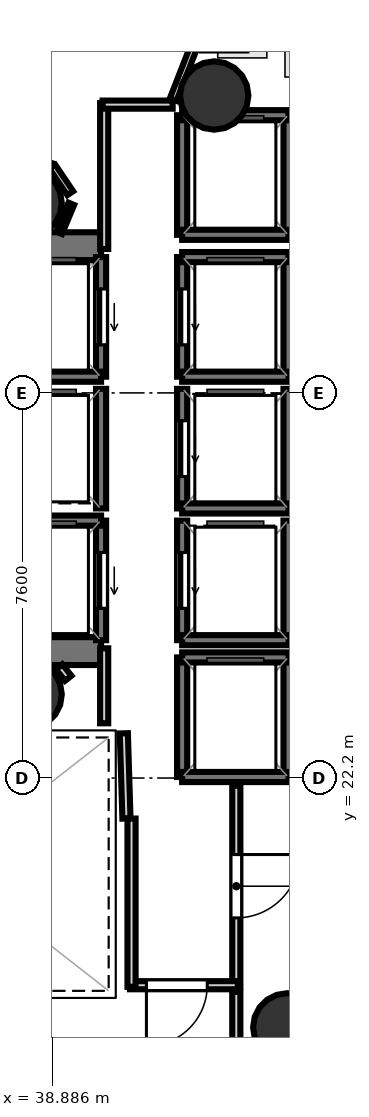
"""IFC4 building model, lengths in metres.
Left out: names, types, materials, properties, quantities, classifications, styles, units other than length and angle.
Written with IfcOpenShell. Run it as: python <this file> out.ifc"""

import sys

from ifc_helpers import new_model, si_unit, direction, frame, frame_2d, origin, origin_2d, place, context, subcontext, project, spatial, rectangle, hollow_circle, extrude, element, fill, save


model = new_model("IFC4")
c1 = context("Model", 3, precision=1e-05, world=origin(), true_north=direction((0.0, 1.0)))
c2 = subcontext(c1, "Body", "Model", "MODEL_VIEW")
j1 = project(units=[si_unit("LENGTHUNIT", "METRE"), si_unit("PLANEANGLEUNIT", "RADIAN")], contexts=[c1])
p1 = place(None, origin())
s1 = spatial("IfcSite", under=j1, at=p1, CompositionType="ELEMENT")
p2 = place(p1, origin())
s2 = spatial("IfcBuilding", under=s1, at=p2, CompositionType="ELEMENT")
p3 = place(p2, frame((0.0, 0.0, 180.9)))
s3 = spatial("IfcBuildingStorey", under=s2, at=p3, CompositionType="ELEMENT", Elevation=180.9)
p4 = place(p3, frame((29.23, 32.695, 0.0), z_axis=(0.0, 0.0, 1.0), x_axis=(1.0, 0.0, 0.0)))
e1 = element("IfcWall", 1, at=p4, inside=s3, PredefinedType="SHEAR", context=c2, shape_type="SweptSolid", body=[
    extrude(rectangle(XDim=10.62, YDim=0.55, at=frame_2d((5.31, 0.0))), origin(), (0.0, 0.0, 1.0), 3.4),
])
p5 = place(p4, frame((0.995, 0.0, 0.0)))
e2 = element("IfcOpeningElement", 2, at=p5, cuts=e1, PredefinedType="OPENING", context=c2, shape_type="SweptSolid", body=[
    extrude(rectangle(XDim=1.25, YDim=2.15, at=frame_2d((0.625, 1.075))), frame((0.0, 0.285, 0.0), z_axis=(0.0, -1.0, 0.0), x_axis=(1.0, 0.0, 0.0)), (0.0, 0.0, 1.0), 0.57),
])
p6 = place(p3, frame((29.23, 24.705, 0.0), z_axis=(0.0, 0.0, 1.0), x_axis=(1.0, 0.0, 0.0)))
e3 = element("IfcWall", 3, at=p6, inside=s3, PredefinedType="SHEAR", context=c2, shape_type="SweptSolid", body=[
    extrude(rectangle(XDim=10.62, YDim=0.55, at=frame_2d((5.31, 0.0))), origin(), (0.0, 0.0, 1.0), 3.4),
])
p7 = place(p6, frame((0.795, 0.0, 0.0)))
e4 = element("IfcOpeningElement", 4, at=p7, cuts=e3, PredefinedType="OPENING", context=c2, shape_type="SweptSolid", body=[
    extrude(rectangle(XDim=1.25, YDim=2.15, at=frame_2d((0.625, 1.075))), frame((0.0, 0.285, 0.0), z_axis=(0.0, -1.0, 0.0), x_axis=(1.0, 0.0, 0.0)), (0.0, 0.0, 1.0), 0.57),
])
for number, where, z_axis, x_axis in (
    (5, (38.4, 33.55, 0.0), (0.0, 0.0, 1.0), (1.0, 0.0, 0.0)),
    (6, (38.4, 23.85, 0.0), (0.0, 0.0, 1.0), (1.0, 0.0, 0.0)),
    (7, (42.083, 35.669, 0.0), (0.0, 0.0, 1.0), (1.0, 0.0, 0.0)),
    (8, (43.525, 17.279, 0.0), (0.0, 0.0, 1.0), (1.0, 0.0, 0.0)),
):
    element("IfcColumn", number, at=place(p3, frame(where, z_axis=z_axis, x_axis=x_axis)), inside=s3, PredefinedType="COLUMN", context=c2, shape_type="SweptSolid", body=[
        extrude(hollow_circle(Radius=0.675, WallThickness=0.032, at=origin_2d()), origin(), (0.0, 0.0, 1.0), 3.7),
    ])
p8 = place(p3, frame((39.85, 30.12, 0.0), z_axis=(0.0, 0.0, 1.0), x_axis=(0.0, 1.0, 0.0)))
e9 = element("IfcWall", 9, at=p8, inside=s3, PredefinedType="SOLIDWALL", context=c2, shape_type="SweptSolid", body=[
    extrude(rectangle(XDim=2.36, YDim=0.2, at=frame_2d((1.18, 0.0))), origin(), (0.0, 0.0, 1.0), 3.4),
])
p9 = place(p8, frame((0.63, 0.0, 0.0)))
e10 = element("IfcOpeningElement", 10, at=p9, cuts=e9, PredefinedType="OPENING", context=c2, shape_type="SweptSolid", body=[
    extrude(rectangle(XDim=1.1, YDim=2.15, at=frame_2d((0.55, 1.075))), frame((0.0, 0.11, 0.0), z_axis=(0.0, -1.0, 0.0), x_axis=(1.0, 0.0, 0.0)), (0.0, 0.0, 1.0), 0.22),
])
p10 = place(p3, frame((37.75, 30.12, 0.0), z_axis=(0.0, 0.0, 1.0), x_axis=(1.0, 0.0, 0.0)))
e11 = element("IfcWall", 11, at=p10, inside=s3, PredefinedType="SOLIDWALL", context=c2, shape_type="SweptSolid", body=[
    extrude(rectangle(XDim=2.1, YDim=0.2, at=frame_2d((1.05, 0.0))), origin(), (0.0, 0.0, 1.0), 3.4),
])
p11 = place(p3, frame((39.85, 24.92, 0.0), z_axis=(0.0, 0.0, 1.0), x_axis=(0.0, 1.0, 0.0)))
e12 = element("IfcWall", 12, at=p11, inside=s3, PredefinedType="SOLIDWALL", context=c2, shape_type="SweptSolid", body=[
    extrude(rectangle(XDim=2.36, YDim=0.2, at=frame_2d((1.18, 0.0))), origin(), (0.0, 0.0, 1.0), 3.4),
])
p12 = place(p11, frame((0.63, 0.0, 0.0)))
e13 = element("IfcOpeningElement", 13, at=p12, cuts=e12, PredefinedType="OPENING", context=c2, shape_type="SweptSolid", body=[
    extrude(rectangle(XDim=1.1, YDim=2.15, at=frame_2d((0.55, 1.075))), frame((0.0, 0.11, 0.0), z_axis=(0.0, -1.0, 0.0), x_axis=(1.0, 0.0, 0.0)), (0.0, 0.0, 1.0), 0.22),
])
p13 = place(p3, frame((37.75, 27.28, 0.0), z_axis=(0.0, 0.0, 1.0), x_axis=(1.0, 0.0, 0.0)))
e14 = element("IfcWall", 14, at=p13, inside=s3, PredefinedType="SOLIDWALL", context=c2, shape_type="SweptSolid", body=[
    extrude(rectangle(XDim=2.1, YDim=0.2, at=frame_2d((1.05, 0.0))), origin(), (0.0, 0.0, 1.0), 3.4),
])
p14 = place(p3, frame((43.55, 30.12, 0.0), z_axis=(0.0, 0.0, 1.0), x_axis=(0.0, 1.0, 0.0)))
e15 = element("IfcWall", 15, at=p14, inside=s3, PredefinedType="SOLIDWALL", context=c2, shape_type="SweptSolid", body=[
    extrude(rectangle(XDim=2.36, YDim=0.2, at=frame_2d((1.18, 0.0))), origin(), (0.0, 0.0, 1.0), 3.4),
])
p15 = place(p3, frame((41.45, 30.12, 0.0), z_axis=(0.0, 0.0, 1.0), x_axis=(0.0, 1.0, 0.0)))
e16 = element("IfcWall", 16, at=p15, inside=s3, PredefinedType="SOLIDWALL", context=c2, shape_type="SweptSolid", body=[
    extrude(rectangle(XDim=2.36, YDim=0.2, at=frame_2d((1.18, 0.0))), origin(), (0.0, 0.0, 1.0), 3.4),
])
p16 = place(p15, frame((0.63, 0.0, 0.0)))
e17 = element("IfcOpeningElement", 17, at=p16, cuts=e16, PredefinedType="OPENING", context=c2, shape_type="SweptSolid", body=[
    extrude(rectangle(XDim=1.1, YDim=2.15, at=frame_2d((0.55, 1.075))), frame((0.0, 0.11, 0.0), z_axis=(0.0, -1.0, 0.0), x_axis=(1.0, 0.0, 0.0)), (0.0, 0.0, 1.0), 0.22),
])
for number, where, z_axis, x_axis in (
    (18, (41.45, 32.48, 0.0), (0.0, 0.0, 1.0), (1.0, 0.0, 0.0)),
    (19, (41.45, 30.12, 0.0), (0.0, 0.0, 1.0), (1.0, 0.0, 0.0)),
):
    element("IfcWall", number, at=place(p3, frame(where, z_axis=z_axis, x_axis=x_axis)), inside=s3, PredefinedType="SOLIDWALL", context=c2, shape_type="SweptSolid", body=[
        extrude(rectangle(XDim=2.1, YDim=0.2, at=frame_2d((1.05, 0.0))), origin(), (0.0, 0.0, 1.0), 3.4),
    ])
p17 = place(p3, frame((43.55, 27.52, 0.0), z_axis=(0.0, 0.0, 1.0), x_axis=(0.0, 1.0, 0.0)))
e20 = element("IfcWall", 20, at=p17, inside=s3, PredefinedType="SOLIDWALL", context=c2, shape_type="SweptSolid", body=[
    extrude(rectangle(XDim=2.36, YDim=0.2, at=frame_2d((1.18, 0.0))), origin(), (0.0, 0.0, 1.0), 3.4),
])
p18 = place(p3, frame((41.45, 27.52, 0.0), z_axis=(0.0, 0.0, 1.0), x_axis=(0.0, 1.0, 0.0)))
e21 = element("IfcWall", 21, at=p18, inside=s3, PredefinedType="SOLIDWALL", context=c2, shape_type="SweptSolid", body=[
    extrude(rectangle(XDim=2.36, YDim=0.2, at=frame_2d((1.18, 0.0))), origin(), (0.0, 0.0, 1.0), 3.4),
])
p19 = place(p18, frame((0.63, 0.0, 0.0)))
e22 = element("IfcOpeningElement", 22, at=p19, cuts=e21, PredefinedType="OPENING", context=c2, shape_type="SweptSolid", body=[
    extrude(rectangle(XDim=1.1, YDim=2.15, at=frame_2d((0.55, 1.075))), frame((0.0, 0.11, 0.0), z_axis=(0.0, -1.0, 0.0), x_axis=(1.0, 0.0, 0.0)), (0.0, 0.0, 1.0), 0.22),
])
p20 = place(p3, frame((41.45, 27.52, 0.0), z_axis=(0.0, 0.0, 1.0), x_axis=(1.0, 0.0, 0.0)))
e23 = element("IfcWall", 23, at=p20, inside=s3, PredefinedType="SOLIDWALL", context=c2, shape_type="SweptSolid", body=[
    extrude(rectangle(XDim=2.1, YDim=0.2, at=frame_2d((1.05, 0.0))), origin(), (0.0, 0.0, 1.0), 3.4),
])
p21 = place(p3, frame((43.55, 24.92, 0.0), z_axis=(0.0, 0.0, 1.0), x_axis=(0.0, 1.0, 0.0)))
e24 = element("IfcWall", 24, at=p21, inside=s3, PredefinedType="SOLIDWALL", context=c2, shape_type="SweptSolid", body=[
    extrude(rectangle(XDim=2.36, YDim=0.2, at=frame_2d((1.18, 0.0))), origin(), (0.0, 0.0, 1.0), 3.4),
])
p22 = place(p3, frame((41.45, 24.92, 0.0), z_axis=(0.0, 0.0, 1.0), x_axis=(0.0, 1.0, 0.0)))
e25 = element("IfcWall", 25, at=p22, inside=s3, PredefinedType="SOLIDWALL", context=c2, shape_type="SweptSolid", body=[
    extrude(rectangle(XDim=2.36, YDim=0.2, at=frame_2d((1.18, 0.0))), origin(), (0.0, 0.0, 1.0), 3.4),
])
p23 = place(p22, frame((0.63, 0.0, 0.0)))
e26 = element("IfcOpeningElement", 26, at=p23, cuts=e25, PredefinedType="OPENING", context=c2, shape_type="SweptSolid", body=[
    extrude(rectangle(XDim=1.1, YDim=2.15, at=frame_2d((0.55, 1.075))), frame((0.0, 0.11, 0.0), z_axis=(0.0, -1.0, 0.0), x_axis=(1.0, 0.0, 0.0)), (0.0, 0.0, 1.0), 0.22),
])
p24 = place(p3, frame((41.45, 24.92, 0.0), z_axis=(0.0, 0.0, 1.0), x_axis=(1.0, 0.0, 0.0)))
e27 = element("IfcWall", 27, at=p24, inside=s3, PredefinedType="SOLIDWALL", context=c2, shape_type="SweptSolid", body=[
    extrude(rectangle(XDim=2.1, YDim=0.2, at=frame_2d((1.05, 0.0))), origin(), (0.0, 0.0, 1.0), 3.4),
])
p25 = place(p3, frame((39.85, 27.52, 0.0), z_axis=(0.0, 0.0, 1.0), x_axis=(0.0, 1.0, 0.0)))
e28 = element("IfcWall", 28, at=p25, inside=s3, PredefinedType="SOLIDWALL", context=c2, shape_type="SweptSolid", body=[
    extrude(rectangle(XDim=2.36, YDim=0.2, at=frame_2d((1.18, 0.0))), origin(), (0.0, 0.0, 1.0), 3.4),
])
for number, where, z_axis, x_axis in (
    (29, (43.55, 22.22, 0.0), (0.0, 0.0, 1.0), (0.0, 1.0, 0.0)),
    (30, (41.45, 22.22, 0.0), (0.0, 0.0, 1.0), (0.0, 1.0, 0.0)),
):
    element("IfcWall", number, at=place(p3, frame(where, z_axis=z_axis, x_axis=x_axis)), inside=s3, PredefinedType="SOLIDWALL", context=c2, shape_type="SweptSolid", body=[
        extrude(rectangle(XDim=2.36, YDim=0.2, at=frame_2d((1.18, 0.0))), origin(), (0.0, 0.0, 1.0), 3.4),
    ])
for number, where, z_axis, x_axis in (
    (31, (41.45, 24.58, 0.0), (0.0, 0.0, 1.0), (1.0, 0.0, 0.0)),
    (32, (41.45, 22.22, 0.0), (0.0, 0.0, 1.0), (1.0, 0.0, 0.0)),
):
    element("IfcWall", number, at=place(p3, frame(where, z_axis=z_axis, x_axis=x_axis)), inside=s3, PredefinedType="SOLIDWALL", context=c2, shape_type="SweptSolid", body=[
        extrude(rectangle(XDim=2.1, YDim=0.2, at=frame_2d((1.05, 0.0))), origin(), (0.0, 0.0, 1.0), 3.4),
    ])
for number, where, z_axis, x_axis in (
    (33, (43.55, 32.92, 0.0), (0.0, 0.0, 1.0), (0.0, 1.0, 0.0)),
    (34, (41.45, 32.92, 0.0), (0.0, 0.0, 1.0), (0.0, 1.0, 0.0)),
):
    element("IfcWall", number, at=place(p3, frame(where, z_axis=z_axis, x_axis=x_axis)), inside=s3, PredefinedType="SOLIDWALL", context=c2, shape_type="SweptSolid", body=[
        extrude(rectangle(XDim=2.36, YDim=0.2, at=frame_2d((1.18, 0.0))), origin(), (0.0, 0.0, 1.0), 3.4),
    ])
for number, where, z_axis, x_axis in (
    (35, (41.45, 35.28, 0.0), (0.0, 0.0, 1.0), (1.0, 0.0, 0.0)),
    (36, (41.45, 32.92, 0.0), (0.0, 0.0, 1.0), (1.0, 0.0, 0.0)),
):
    element("IfcWall", number, at=place(p3, frame(where, z_axis=z_axis, x_axis=x_axis)), inside=s3, PredefinedType="SOLIDWALL", context=c2, shape_type="SweptSolid", body=[
        extrude(rectangle(XDim=2.1, YDim=0.2, at=frame_2d((1.05, 0.0))), origin(), (0.0, 0.0, 1.0), 3.4),
    ])
p26 = place(p3, frame((40.351, 21.401, 0.0), z_axis=(0.0, 0.0, 1.0), x_axis=(-0.031058045979, 0.999517582527, 0.0)))
e37 = element("IfcWall", 37, at=p26, inside=s3, PredefinedType="PARTITIONING", context=c2, shape_type="SweptSolid", body=[
    extrude(rectangle(XDim=1.682, YDim=0.16, at=frame_2d((0.841, 0.0))), origin(), (0.0, 0.0, 1.0), 2.72),
])
p27 = place(p3, frame((39.911, 23.28, 0.0), z_axis=(0.0, 0.0, 1.0), x_axis=(0.0, 1.0, 0.0)))
e38 = element("IfcWall", 38, at=p27, inside=s3, PredefinedType="PARTITIONING", context=c2, shape_type="SweptSolid", body=[
    extrude(rectangle(XDim=1.48, YDim=0.16, at=frame_2d((0.74, 0.0))), origin(), (0.0, 0.0, 1.0), 2.72),
])
p28 = place(p3, frame((39.911, 32.64, 0.0), z_axis=(0.0, 0.0, 1.0), x_axis=(0.0, 1.0, 0.0)))
e39 = element("IfcWall", 39, at=p28, inside=s3, PredefinedType="PARTITIONING", context=c2, shape_type="SweptSolid", body=[
    extrude(rectangle(XDim=2.88, YDim=0.16, at=frame_2d((1.44, 0.0))), origin(), (0.0, 0.0, 1.0), 2.72),
])
p29 = place(p3, frame((39.88, 35.489, 0.0), z_axis=(0.0, 0.0, 1.0), x_axis=(1.0, 0.0, 0.0)))
e40 = element("IfcWall", 40, at=p29, inside=s3, PredefinedType="PARTITIONING", context=c2, shape_type="SweptSolid", body=[
    extrude(rectangle(XDim=1.383, YDim=0.16, at=frame_2d((0.691, 0.0))), origin(), (0.0, 0.0, 1.0), 2.72),
])
p30 = place(p3, frame((42.519, 22.05, 0.0), z_axis=(0.0, 0.0, 1.0), x_axis=(0.0, -1.0, 0.0)))
e41 = element("IfcWall", 41, at=p30, inside=s3, PredefinedType="PARTITIONING", context=c2, shape_type="SweptSolid", body=[
    extrude(rectangle(XDim=3.97, YDim=0.16, at=frame_2d((1.985, 0.0))), origin(), (0.0, 0.0, 1.0), 2.72),
])
p31 = place(p30, frame((1.36, 0.0, 0.0)))
e42 = element("IfcOpeningElement", 42, at=p31, cuts=e41, PredefinedType="OPENING", context=c2, shape_type="SweptSolid", body=[
    extrude(rectangle(XDim=1.25, YDim=2.2, at=frame_2d((0.625, 1.1))), frame((0.0, 0.09, 0.0), z_axis=(0.0, -1.0, 0.0), x_axis=(1.0, 0.0, 0.0)), (0.0, 0.0, 1.0), 0.18),
])
p32 = place(p3, frame((42.55, 18.111, 0.0), z_axis=(0.0, 0.0, 1.0), x_axis=(-1.0, 0.0, 0.0)))
e43 = element("IfcWall", 43, at=p32, inside=s3, PredefinedType="PARTITIONING", context=c2, shape_type="SweptSolid", body=[
    extrude(rectangle(XDim=2.13, YDim=0.16, at=frame_2d((1.065, 0.0))), origin(), (0.0, 0.0, 1.0), 2.72),
])
p33 = place(p32, frame((0.605, 0.0, 0.0)))
e44 = element("IfcOpeningElement", 44, at=p33, cuts=e43, PredefinedType="OPENING", context=c2, shape_type="SweptSolid", body=[
    extrude(rectangle(XDim=1.2, YDim=2.15, at=frame_2d((0.6, 1.075))), frame((0.0, 0.09, 0.0), z_axis=(0.0, -1.0, 0.0), x_axis=(1.0, 0.0, 0.0)), (0.0, 0.0, 1.0), 0.18),
])
p34 = place(p3, frame((40.451, 18.08, 0.0), z_axis=(0.0, 0.0, 1.0), x_axis=(0.0, 1.0, 0.0)))
e45 = element("IfcWall", 45, at=p34, inside=s3, PredefinedType="PARTITIONING", context=c2, shape_type="SweptSolid", body=[
    extrude(rectangle(XDim=3.32, YDim=0.16, at=frame_2d((1.66, 0.0))), origin(), (0.0, 0.0, 1.0), 2.72),
])
p35 = place(p3, frame((39.202, 24.169, 0.0), z_axis=(0.0, 0.0, 1.0), x_axis=(-0.621699046284, 0.783256213413, 0.0)))
e46 = element("IfcWall", 46, at=p35, inside=s3, PredefinedType="PARTITIONING", context=c2, shape_type="SweptSolid", body=[
    extrude(rectangle(XDim=0.289, YDim=0.16, at=frame_2d((0.144, 0.0))), origin(), (0.0, 0.0, 1.0), 2.72),
])
p36 = place(p3, frame((42.519, 17.98, 0.0), z_axis=(0.0, 0.0, 1.0), x_axis=(0.0, -1.0, 0.0)))
e47 = element("IfcWall", 47, at=p36, inside=s3, PredefinedType="PARTITIONING", context=c2, shape_type="SweptSolid", body=[
    extrude(rectangle(XDim=3.002, YDim=0.16, at=frame_2d((1.501, 0.0))), origin(), (0.0, 0.0, 1.0), 2.72),
])
p37 = place(p3, frame((41.273, 35.589, 0.0), z_axis=(0.0, 0.0, 1.0), x_axis=(0.364552894348, 0.931182681981, 0.0)))
e48 = element("IfcWall", 48, at=p37, inside=s3, PredefinedType="PARTITIONING", context=c2, shape_type="SweptSolid", body=[
    extrude(rectangle(XDim=1.739, YDim=0.14, at=frame_2d((0.869, 0.0))), origin(), (0.0, 0.0, 1.0), 2.72),
])
p38 = place(p3, frame((39.241, 33.741, 0.0), z_axis=(0.0, 0.0, 1.0), x_axis=(-0.559619584068, 0.828749613048, 0.0)))
e49 = element("IfcWall", 49, at=p38, inside=s3, PredefinedType="PARTITIONING", context=c2, shape_type="SweptSolid", body=[
    extrude(rectangle(XDim=0.629, YDim=0.14, at=frame_2d((0.314, 0.0))), origin(), (0.0, 0.0, 1.0), 2.72),
])
p39 = place(p3, frame((38.873, 34.274, 0.0), z_axis=(0.0, 0.0, 1.0), x_axis=(-0.956850575764, 0.290580411693, 0.0)))
e50 = element("IfcWall", 50, at=p39, inside=s3, PredefinedType="PARTITIONING", context=c2, shape_type="SweptSolid", body=[
    extrude(rectangle(XDim=0.485, YDim=0.12, at=frame_2d((0.242, 0.0))), origin(), (0.0, 0.0, 1.0), 2.72),
])
p40 = place(p3, frame((39.023, 32.958, 0.0), z_axis=(0.0, 0.0, 1.0), x_axis=(0.385702795868, 0.922623082987, 0.0)))
e51 = element("IfcWall", 51, at=p40, inside=s3, PredefinedType="PARTITIONING", context=c2, shape_type="SweptSolid", body=[
    extrude(rectangle(XDim=0.622, YDim=0.12, at=frame_2d((0.311, 0.0))), origin(), (0.0, 0.0, 1.0), 2.72),
])
p41 = place(p9, origin())
e52 = element("IfcDoor", 52, at=p41, inside=s3, OperationType="SLIDING_TO_LEFT", PredefinedType="DOOR", context=c2, shape_type="SweptSolid", body=[
    extrude(rectangle(XDim=1.1, YDim=2.15, at=frame_2d((0.55, 1.075))), frame((0.0, 0.025, 0.0), z_axis=(0.0, -1.0, 0.0), x_axis=(1.0, 0.0, 0.0)), (0.0, 0.0, 1.0), 0.05),
])
fill(e10, e52)
p42 = place(p12, origin())
e53 = element("IfcDoor", 53, at=p42, inside=s3, OperationType="SLIDING_TO_LEFT", PredefinedType="DOOR", context=c2, shape_type="SweptSolid", body=[
    extrude(rectangle(XDim=1.1, YDim=2.15, at=frame_2d((0.55, 1.075))), frame((0.0, 0.025, 0.0), z_axis=(0.0, -1.0, 0.0), x_axis=(1.0, 0.0, 0.0)), (0.0, 0.0, 1.0), 0.05),
])
fill(e13, e53)
p43 = place(p16, origin())
e54 = element("IfcDoor", 54, at=p43, inside=s3, OperationType="SLIDING_TO_LEFT", PredefinedType="DOOR", context=c2, shape_type="SweptSolid", body=[
    extrude(rectangle(XDim=1.1, YDim=2.15, at=frame_2d((0.55, 1.075))), frame((0.0, 0.025, 0.0), z_axis=(0.0, -1.0, 0.0), x_axis=(1.0, 0.0, 0.0)), (0.0, 0.0, 1.0), 0.05),
])
fill(e17, e54)
p44 = place(p19, origin())
e55 = element("IfcDoor", 55, at=p44, inside=s3, OperationType="SLIDING_TO_LEFT", PredefinedType="DOOR", context=c2, shape_type="SweptSolid", body=[
    extrude(rectangle(XDim=1.1, YDim=2.15, at=frame_2d((0.55, 1.075))), frame((0.0, 0.025, 0.0), z_axis=(0.0, -1.0, 0.0), x_axis=(1.0, 0.0, 0.0)), (0.0, 0.0, 1.0), 0.05),
])
fill(e22, e55)
p45 = place(p23, origin())
e56 = element("IfcDoor", 56, at=p45, inside=s3, OperationType="SLIDING_TO_LEFT", PredefinedType="DOOR", context=c2, shape_type="SweptSolid", body=[
    extrude(rectangle(XDim=1.1, YDim=2.15, at=frame_2d((0.55, 1.075))), frame((0.0, 0.025, 0.0), z_axis=(0.0, -1.0, 0.0), x_axis=(1.0, 0.0, 0.0)), (0.0, 0.0, 1.0), 0.05),
])
fill(e26, e56)
p46 = place(p33, origin())
e57 = element("IfcDoor", 57, at=p46, inside=s3, OperationType="SINGLE_SWING_RIGHT", PredefinedType="DOOR", context=c2, shape_type="SweptSolid", body=[
    extrude(rectangle(XDim=1.2, YDim=2.15, at=frame_2d((0.6, 1.075))), frame((0.0, 0.025, 0.0), z_axis=(0.0, -1.0, 0.0), x_axis=(1.0, 0.0, 0.0)), (0.0, 0.0, 1.0), 0.05),
])
fill(e44, e57)
p47 = place(p31, origin())
e58 = element("IfcDoor", 58, at=p47, inside=s3, OperationType="SINGLE_SWING_LEFT", PredefinedType="DOOR", context=c2, shape_type="SweptSolid", body=[
    extrude(rectangle(XDim=1.25, YDim=2.2, at=frame_2d((0.625, 1.1))), frame((0.0, 0.025, 0.0), z_axis=(0.0, -1.0, 0.0), x_axis=(1.0, 0.0, 0.0)), (0.0, 0.0, 1.0), 0.05),
])
fill(e42, e58)
save(model, sys.argv[1])
